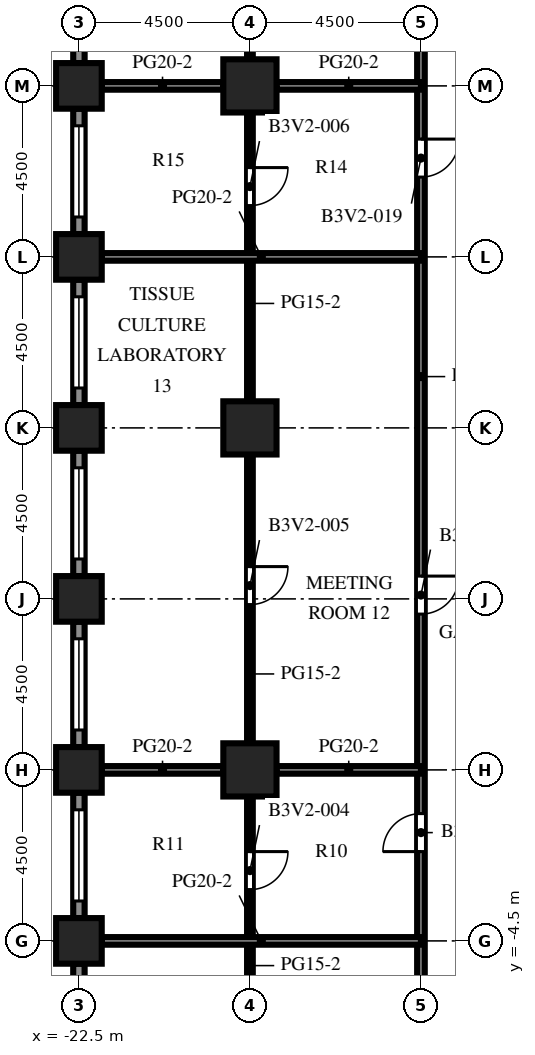
"""IFC4 building model, lengths in metres.
Left out: names, types, materials, properties, quantities, classifications, styles, units other than length and angle.
Written with IfcOpenShell. Run it as: python <this file> out.ifc"""

import sys

from ifc_helpers import new_model, si_unit, direction, frame, frame_2d, origin, origin_2d, place, context, subcontext, project, spatial, rectangle, extrude, element, fill, save


model = new_model("IFC4")
c1 = context("Model", 3, precision=1e-05, world=origin(), true_north=direction((0.0, 1.0)))
c2 = subcontext(c1, "Body", "Model", "MODEL_VIEW")
j1 = project(units=[si_unit("LENGTHUNIT", "METRE"), si_unit("PLANEANGLEUNIT", "RADIAN")], contexts=[c1])
p1 = place(None, origin())
s1 = spatial("IfcSite", under=j1, at=p1, CompositionType="ELEMENT")
p2 = place(p1, origin())
s2 = spatial("IfcBuilding", under=s1, at=p2, CompositionType="ELEMENT")
p3 = place(p2, frame((0.0, 0.0, 106.6)))
s3 = spatial("IfcBuildingStorey", under=s2, at=p3, CompositionType="ELEMENT", Elevation=106.6)
for number, where, z_axis, x_axis in (
    (1, (-22.5, -4.5, 0.0), (0.0, 0.0, 1.0), (1.0, 0.0, 0.0)),
    (2, (-22.5, 0.0, 0.0), (0.0, 0.0, 1.0), (1.0, 0.0, 0.0)),
    (3, (-22.5, 4.5, 0.0), (0.0, 0.0, 1.0), (1.0, 0.0, 0.0)),
    (4, (-22.5, 9.0, 0.0), (0.0, 0.0, 1.0), (1.0, 0.0, 0.0)),
    (5, (-22.5, 13.5, 0.0), (0.0, 0.0, 1.0), (1.0, 0.0, 0.0)),
    (6, (-22.5, 18.0, 0.0), (0.0, 0.0, 1.0), (1.0, 0.0, 0.0)),
):
    element("IfcColumn", number, at=place(p3, frame(where, z_axis=z_axis, x_axis=x_axis)), inside=s3, PredefinedType="COLUMN", context=c2, shape_type="SweptSolid", body=[
        extrude(rectangle(XDim=1.2, YDim=1.2, at=origin_2d()), origin(), (0.0, 0.0, 1.0), 4.1),
    ])
for number, where, z_axis, x_axis in (
    (7, (-18.0, 0.0, 0.0), (0.0, 0.0, 1.0), (1.0, 0.0, 0.0)),
    (8, (-18.0, 9.0, 0.0), (0.0, 0.0, 1.0), (1.0, 0.0, 0.0)),
    (9, (-18.0, 18.0, 0.0), (0.0, 0.0, 1.0), (1.0, 0.0, 0.0)),
):
    element("IfcColumn", number, at=place(p3, frame(where, z_axis=z_axis, x_axis=x_axis)), inside=s3, PredefinedType="COLUMN", context=c2, shape_type="SweptSolid", body=[
        extrude(rectangle(XDim=1.4, YDim=1.4, at=origin_2d()), origin(), (0.0, 0.0, 1.0), 4.1),
    ])
p4 = place(p3, frame((-22.5, 18.6, 0.0), z_axis=(0.0, 0.0, 1.0), x_axis=(0.0, 1.0, 0.0)))
e10 = element("IfcWall", 10, at=p4, inside=s3, PredefinedType="SOLIDWALL", context=c2, shape_type="SweptSolid", body=[
    extrude(rectangle(XDim=3.3, YDim=0.3, at=frame_2d((1.65, 0.0))), origin(), (0.0, 0.0, 1.0), 2.6),
])
p5 = place(p4, frame((1.15, 0.0, 0.0)))
e11 = element("IfcOpeningElement", 11, at=p5, cuts=e10, PredefinedType="OPENING", context=c2, shape_type="SweptSolid", body=[
    extrude(rectangle(XDim=1.0, YDim=2.2, at=frame_2d((0.5, 1.1))), frame((0.0, 0.16, 0.0), z_axis=(0.0, -1.0, 0.0), x_axis=(1.0, 0.0, 0.0)), (0.0, 0.0, 1.0), 0.32),
])
p6 = place(p3, frame((-22.5, 14.1, 0.0), z_axis=(0.0, 0.0, 1.0), x_axis=(0.0, 1.0, 0.0)))
e12 = element("IfcWall", 12, at=p6, inside=s3, PredefinedType="SOLIDWALL", context=c2, shape_type="SweptSolid", body=[
    extrude(rectangle(XDim=3.3, YDim=0.3, at=frame_2d((1.65, 0.0))), origin(), (0.0, 0.0, 1.0), 2.6),
])
p7 = place(p6, frame((0.45, 0.0, 0.8)))
e13 = element("IfcOpeningElement", 13, at=p7, cuts=e12, PredefinedType="OPENING", context=c2, shape_type="SweptSolid", body=[
    extrude(rectangle(XDim=2.4, YDim=1.7, at=frame_2d((1.2, 0.85))), frame((0.0, 0.16, 0.0), z_axis=(0.0, -1.0, 0.0), x_axis=(1.0, 0.0, 0.0)), (0.0, 0.0, 1.0), 0.32),
])
p8 = place(p3, frame((-22.5, 9.6, 0.0), z_axis=(0.0, 0.0, 1.0), x_axis=(0.0, 1.0, 0.0)))
e14 = element("IfcWall", 14, at=p8, inside=s3, PredefinedType="SOLIDWALL", context=c2, shape_type="SweptSolid", body=[
    extrude(rectangle(XDim=3.3, YDim=0.3, at=frame_2d((1.65, 0.0))), origin(), (0.0, 0.0, 1.0), 2.6),
])
p9 = place(p8, frame((0.45, 0.0, 0.8)))
e15 = element("IfcOpeningElement", 15, at=p9, cuts=e14, PredefinedType="OPENING", context=c2, shape_type="SweptSolid", body=[
    extrude(rectangle(XDim=2.4, YDim=1.7, at=frame_2d((1.2, 0.85))), frame((0.0, 0.16, 0.0), z_axis=(0.0, -1.0, 0.0), x_axis=(1.0, 0.0, 0.0)), (0.0, 0.0, 1.0), 0.32),
])
p10 = place(p3, frame((-22.5, 5.1, 0.0), z_axis=(0.0, 0.0, 1.0), x_axis=(0.0, 1.0, 0.0)))
e16 = element("IfcWall", 16, at=p10, inside=s3, PredefinedType="SOLIDWALL", context=c2, shape_type="SweptSolid", body=[
    extrude(rectangle(XDim=3.3, YDim=0.3, at=frame_2d((1.65, 0.0))), origin(), (0.0, 0.0, 1.0), 2.6),
])
p11 = place(p10, frame((0.45, 0.0, 0.8)))
e17 = element("IfcOpeningElement", 17, at=p11, cuts=e16, PredefinedType="OPENING", context=c2, shape_type="SweptSolid", body=[
    extrude(rectangle(XDim=2.4, YDim=1.7, at=frame_2d((1.2, 0.85))), frame((0.0, 0.16, 0.0), z_axis=(0.0, -1.0, 0.0), x_axis=(1.0, 0.0, 0.0)), (0.0, 0.0, 1.0), 0.32),
])
p12 = place(p3, frame((-22.5, 0.6, 0.0), z_axis=(0.0, 0.0, 1.0), x_axis=(0.0, 1.0, 0.0)))
e18 = element("IfcWall", 18, at=p12, inside=s3, PredefinedType="SOLIDWALL", context=c2, shape_type="SweptSolid", body=[
    extrude(rectangle(XDim=3.3, YDim=0.3, at=frame_2d((1.65, 0.0))), origin(), (0.0, 0.0, 1.0), 2.6),
])
p13 = place(p12, frame((0.45, 0.0, 0.8)))
e19 = element("IfcOpeningElement", 19, at=p13, cuts=e18, PredefinedType="OPENING", context=c2, shape_type="SweptSolid", body=[
    extrude(rectangle(XDim=2.4, YDim=1.7, at=frame_2d((1.2, 0.85))), frame((0.0, 0.16, 0.0), z_axis=(0.0, -1.0, 0.0), x_axis=(1.0, 0.0, 0.0)), (0.0, 0.0, 1.0), 0.32),
])
p14 = place(p3, frame((-22.5, -3.9, 0.0), z_axis=(0.0, 0.0, 1.0), x_axis=(0.0, 1.0, 0.0)))
e20 = element("IfcWall", 20, at=p14, inside=s3, PredefinedType="SOLIDWALL", context=c2, shape_type="SweptSolid", body=[
    extrude(rectangle(XDim=3.3, YDim=0.3, at=frame_2d((1.65, 0.0))), origin(), (0.0, 0.0, 1.0), 2.6),
])
p15 = place(p14, frame((0.45, 0.0, 0.8)))
e21 = element("IfcOpeningElement", 21, at=p15, cuts=e20, PredefinedType="OPENING", context=c2, shape_type="SweptSolid", body=[
    extrude(rectangle(XDim=2.4, YDim=1.7, at=frame_2d((1.2, 0.85))), frame((0.0, 0.16, 0.0), z_axis=(0.0, -1.0, 0.0), x_axis=(1.0, 0.0, 0.0)), (0.0, 0.0, 1.0), 0.32),
])
p16 = place(p3, frame((-22.5, -8.4, 0.0), z_axis=(0.0, 0.0, 1.0), x_axis=(0.0, 1.0, 0.0)))
e22 = element("IfcWall", 22, at=p16, inside=s3, PredefinedType="SOLIDWALL", context=c2, shape_type="SweptSolid", body=[
    extrude(rectangle(XDim=3.3, YDim=0.3, at=frame_2d((1.65, 0.0))), origin(), (0.0, 0.0, 1.0), 2.6),
])
p17 = place(p16, frame((0.45, 0.0, 0.8)))
e23 = element("IfcOpeningElement", 23, at=p17, cuts=e22, PredefinedType="OPENING", context=c2, shape_type="SweptSolid", body=[
    extrude(rectangle(XDim=2.4, YDim=1.7, at=frame_2d((1.2, 0.85))), frame((0.0, 0.16, 0.0), z_axis=(0.0, -1.0, 0.0), x_axis=(1.0, 0.0, 0.0)), (0.0, 0.0, 1.0), 0.32),
])
p18 = place(p3, frame((-18.0, -8.3, 0.0), z_axis=(0.0, 0.0, 1.0), x_axis=(0.0, 1.0, 0.0)))
e24 = element("IfcWall", 24, at=p18, inside=s3, PredefinedType="PARTITIONING", context=c2, shape_type="SweptSolid", body=[
    extrude(rectangle(XDim=7.6, YDim=0.15, at=frame_2d((3.8, 0.0))), origin(), (0.0, 0.0, 1.0), 3.5),
])
p19 = place(p18, frame((0.15, 0.0, 0.0)))
e25 = element("IfcOpeningElement", 25, at=p19, cuts=e24, PredefinedType="OPENING", context=c2, shape_type="SweptSolid", body=[
    extrude(rectangle(XDim=1.0, YDim=2.1, at=frame_2d((0.5, 1.05))), frame((0.0, 0.085, 0.0), z_axis=(0.0, -1.0, 0.0), x_axis=(1.0, 0.0, 0.0)), (0.0, 0.0, 1.0), 0.17),
])
p20 = place(p18, frame((5.15, 0.0, 0.0)))
e26 = element("IfcOpeningElement", 26, at=p20, cuts=e24, PredefinedType="OPENING", context=c2, shape_type="SweptSolid", body=[
    extrude(rectangle(XDim=1.0, YDim=2.1, at=frame_2d((0.5, 1.05))), frame((0.0, 0.085, 0.0), z_axis=(0.0, -1.0, 0.0), x_axis=(1.0, 0.0, 0.0)), (0.0, 0.0, 1.0), 0.17),
])
p21 = place(p3, frame((-18.0, 0.7, 0.0), z_axis=(0.0, 0.0, 1.0), x_axis=(0.0, 1.0, 0.0)))
e27 = element("IfcWall", 27, at=p21, inside=s3, PredefinedType="PARTITIONING", context=c2, shape_type="SweptSolid", body=[
    extrude(rectangle(XDim=7.6, YDim=0.15, at=frame_2d((3.8, 0.0))), origin(), (0.0, 0.0, 1.0), 3.5),
])
p22 = place(p21, frame((3.65, 0.0, 0.0)))
e28 = element("IfcOpeningElement", 28, at=p22, cuts=e27, PredefinedType="OPENING", context=c2, shape_type="SweptSolid", body=[
    extrude(rectangle(XDim=1.0, YDim=2.1, at=frame_2d((0.5, 1.05))), frame((0.0, 0.085, 0.0), z_axis=(0.0, -1.0, 0.0), x_axis=(1.0, 0.0, 0.0)), (0.0, 0.0, 1.0), 0.17),
])
p23 = place(p3, frame((-18.0, 9.7, 0.0), z_axis=(0.0, 0.0, 1.0), x_axis=(0.0, 1.0, 0.0)))
e29 = element("IfcWall", 29, at=p23, inside=s3, PredefinedType="PARTITIONING", context=c2, shape_type="SweptSolid", body=[
    extrude(rectangle(XDim=7.6, YDim=0.15, at=frame_2d((3.8, 0.0))), origin(), (0.0, 0.0, 1.0), 3.5),
])
p24 = place(p23, frame((5.15, 0.0, 0.0)))
e30 = element("IfcOpeningElement", 30, at=p24, cuts=e29, PredefinedType="OPENING", context=c2, shape_type="SweptSolid", body=[
    extrude(rectangle(XDim=1.0, YDim=2.1, at=frame_2d((0.5, 1.05))), frame((0.0, 0.085, 0.0), z_axis=(0.0, -1.0, 0.0), x_axis=(1.0, 0.0, 0.0)), (0.0, 0.0, 1.0), 0.17),
])
p25 = place(p3, frame((-18.0, 18.7, 0.0), z_axis=(0.0, 0.0, 1.0), x_axis=(0.0, 1.0, 0.0)))
e31 = element("IfcWall", 31, at=p25, inside=s3, PredefinedType="PARTITIONING", context=c2, shape_type="SweptSolid", body=[
    extrude(rectangle(XDim=3.1, YDim=0.15, at=frame_2d((1.55, 0.0))), origin(), (0.0, 0.0, 1.0), 3.5),
])
p26 = place(p3, frame((-13.5, -21.9, 0.0), z_axis=(0.0, 0.0, 1.0), x_axis=(0.0, 1.0, 0.0)))
e32 = element("IfcWall", 32, at=p26, inside=s3, PredefinedType="PARTITIONING", context=c2, shape_type="SweptSolid", body=[
    extrude(rectangle(XDim=52.8, YDim=0.2, at=frame_2d((26.4, 0.0))), origin(), (0.0, 0.0, 1.0), 3.5),
])
p27 = place(p26, frame((0.75, 0.0, 0.0)))
e33 = element("IfcOpeningElement", 33, at=p27, cuts=e32, PredefinedType="OPENING", context=c2, shape_type="SweptSolid", body=[
    extrude(rectangle(XDim=1.0, YDim=2.1, at=frame_2d((0.5, 1.05))), frame((0.0, 0.11, 0.0), z_axis=(0.0, -1.0, 0.0), x_axis=(1.0, 0.0, 0.0)), (0.0, 0.0, 1.0), 0.22),
])
p28 = place(p26, frame((5.0, 0.0, 0.0)))
e34 = element("IfcOpeningElement", 34, at=p28, cuts=e32, PredefinedType="OPENING", context=c2, shape_type="SweptSolid", body=[
    extrude(rectangle(XDim=1.0, YDim=2.1, at=frame_2d((0.5, 1.05))), frame((0.0, 0.11, 0.0), z_axis=(0.0, -1.0, 0.0), x_axis=(1.0, 0.0, 0.0)), (0.0, 0.0, 1.0), 0.22),
])
p29 = place(p26, frame((12.5, 0.0, 0.0)))
e35 = element("IfcOpeningElement", 35, at=p29, cuts=e32, PredefinedType="OPENING", context=c2, shape_type="SweptSolid", body=[
    extrude(rectangle(XDim=1.0, YDim=2.1, at=frame_2d((0.5, 1.05))), frame((0.0, 0.11, 0.0), z_axis=(0.0, -1.0, 0.0), x_axis=(1.0, 0.0, 0.0)), (0.0, 0.0, 1.0), 0.22),
])
p30 = place(p26, frame((19.75, 0.0, 0.0)))
e36 = element("IfcOpeningElement", 36, at=p30, cuts=e32, PredefinedType="OPENING", context=c2, shape_type="SweptSolid", body=[
    extrude(rectangle(XDim=1.0, YDim=2.1, at=frame_2d((0.5, 1.05))), frame((0.0, 0.11, 0.0), z_axis=(0.0, -1.0, 0.0), x_axis=(1.0, 0.0, 0.0)), (0.0, 0.0, 1.0), 0.22),
])
p31 = place(p26, frame((26.0, 0.0, 0.0)))
e37 = element("IfcOpeningElement", 37, at=p31, cuts=e32, PredefinedType="OPENING", context=c2, shape_type="SweptSolid", body=[
    extrude(rectangle(XDim=1.0, YDim=2.1, at=frame_2d((0.5, 1.05))), frame((0.0, 0.11, 0.0), z_axis=(0.0, -1.0, 0.0), x_axis=(1.0, 0.0, 0.0)), (0.0, 0.0, 1.0), 0.22),
])
p32 = place(p26, frame((37.5, 0.0, 0.0)))
e38 = element("IfcOpeningElement", 38, at=p32, cuts=e32, PredefinedType="OPENING", context=c2, shape_type="SweptSolid", body=[
    extrude(rectangle(XDim=1.0, YDim=2.1, at=frame_2d((0.5, 1.05))), frame((0.0, 0.11, 0.0), z_axis=(0.0, -1.0, 0.0), x_axis=(1.0, 0.0, 0.0)), (0.0, 0.0, 1.0), 0.22),
])
p33 = place(p26, frame((43.25, 0.0, 0.0)))
e39 = element("IfcOpeningElement", 39, at=p33, cuts=e32, PredefinedType="OPENING", context=c2, shape_type="SweptSolid", body=[
    extrude(rectangle(XDim=1.0, YDim=2.1, at=frame_2d((0.5, 1.05))), frame((0.0, 0.11, 0.0), z_axis=(0.0, -1.0, 0.0), x_axis=(1.0, 0.0, 0.0)), (0.0, 0.0, 1.0), 0.22),
])
p34 = place(p26, frame((50.0, 0.0, 0.0)))
e40 = element("IfcOpeningElement", 40, at=p34, cuts=e32, PredefinedType="OPENING", context=c2, shape_type="SweptSolid", body=[
    extrude(rectangle(XDim=1.0, YDim=2.1, at=frame_2d((0.5, 1.05))), frame((0.0, 0.11, 0.0), z_axis=(0.0, -1.0, 0.0), x_axis=(1.0, 0.0, 0.0)), (0.0, 0.0, 1.0), 0.22),
])
p35 = place(p3, frame((-21.9, -4.5, 0.0), z_axis=(0.0, 0.0, 1.0), x_axis=(1.0, 0.0, 0.0)))
e41 = element("IfcWall", 41, at=p35, inside=s3, PredefinedType="PARTITIONING", context=c2, shape_type="SweptSolid", body=[
    extrude(rectangle(XDim=8.4, YDim=0.2, at=frame_2d((4.2, 0.0))), origin(), (0.0, 0.0, 1.0), 3.5),
])
p36 = place(p3, frame((-21.9, 0.0, 0.0), z_axis=(0.0, 0.0, 1.0), x_axis=(1.0, 0.0, 0.0)))
e42 = element("IfcWall", 42, at=p36, inside=s3, PredefinedType="PARTITIONING", context=c2, shape_type="SweptSolid", body=[
    extrude(rectangle(XDim=3.2, YDim=0.2, at=frame_2d((1.6, 0.0))), origin(), (0.0, 0.0, 1.0), 3.5),
])
p37 = place(p3, frame((-17.3, 0.0, 0.0), z_axis=(0.0, 0.0, 1.0), x_axis=(1.0, 0.0, 0.0)))
e43 = element("IfcWall", 43, at=p37, inside=s3, PredefinedType="PARTITIONING", context=c2, shape_type="SweptSolid", body=[
    extrude(rectangle(XDim=3.8, YDim=0.2, at=frame_2d((1.9, 0.0))), origin(), (0.0, 0.0, 1.0), 3.5),
])
p38 = place(p3, frame((-21.9, 13.5, 0.0), z_axis=(0.0, 0.0, 1.0), x_axis=(1.0, 0.0, 0.0)))
e44 = element("IfcWall", 44, at=p38, inside=s3, PredefinedType="PARTITIONING", context=c2, shape_type="SweptSolid", body=[
    extrude(rectangle(XDim=8.4, YDim=0.2, at=frame_2d((4.2, 0.0))), origin(), (0.0, 0.0, 1.0), 3.5),
])
p39 = place(p3, frame((-21.9, 18.0, 0.0), z_axis=(0.0, 0.0, 1.0), x_axis=(1.0, 0.0, 0.0)))
e45 = element("IfcWall", 45, at=p39, inside=s3, PredefinedType="PARTITIONING", context=c2, shape_type="SweptSolid", body=[
    extrude(rectangle(XDim=3.2, YDim=0.2, at=frame_2d((1.6, 0.0))), origin(), (0.0, 0.0, 1.0), 3.5),
])
p40 = place(p3, frame((-17.3, 18.0, 0.0), z_axis=(0.0, 0.0, 1.0), x_axis=(1.0, 0.0, 0.0)))
e46 = element("IfcWall", 46, at=p40, inside=s3, PredefinedType="PARTITIONING", context=c2, shape_type="SweptSolid", body=[
    extrude(rectangle(XDim=3.8, YDim=0.2, at=frame_2d((1.9, 0.0))), origin(), (0.0, 0.0, 1.0), 3.5),
])
p41 = place(p7, origin())
e47 = element("IfcWindow", 47, at=p41, inside=s3, PartitioningType="SINGLE_PANEL", PredefinedType="WINDOW", context=c2, shape_type="SweptSolid", body=[
    extrude(rectangle(XDim=2.4, YDim=1.7, at=frame_2d((1.2, 0.85))), frame((0.0, 0.03, 0.0), z_axis=(0.0, -1.0, 0.0), x_axis=(1.0, 0.0, 0.0)), (0.0, 0.0, 1.0), 0.06),
])
fill(e13, e47)
p42 = place(p9, origin())
e48 = element("IfcWindow", 48, at=p42, inside=s3, PartitioningType="SINGLE_PANEL", PredefinedType="WINDOW", context=c2, shape_type="SweptSolid", body=[
    extrude(rectangle(XDim=2.4, YDim=1.7, at=frame_2d((1.2, 0.85))), frame((0.0, 0.03, 0.0), z_axis=(0.0, -1.0, 0.0), x_axis=(1.0, 0.0, 0.0)), (0.0, 0.0, 1.0), 0.06),
])
fill(e15, e48)
p43 = place(p11, origin())
e49 = element("IfcWindow", 49, at=p43, inside=s3, PartitioningType="SINGLE_PANEL", PredefinedType="WINDOW", context=c2, shape_type="SweptSolid", body=[
    extrude(rectangle(XDim=2.4, YDim=1.7, at=frame_2d((1.2, 0.85))), frame((0.0, 0.03, 0.0), z_axis=(0.0, -1.0, 0.0), x_axis=(1.0, 0.0, 0.0)), (0.0, 0.0, 1.0), 0.06),
])
fill(e17, e49)
p44 = place(p13, origin())
e50 = element("IfcWindow", 50, at=p44, inside=s3, PartitioningType="SINGLE_PANEL", PredefinedType="WINDOW", context=c2, shape_type="SweptSolid", body=[
    extrude(rectangle(XDim=2.4, YDim=1.7, at=frame_2d((1.2, 0.85))), frame((0.0, 0.03, 0.0), z_axis=(0.0, -1.0, 0.0), x_axis=(1.0, 0.0, 0.0)), (0.0, 0.0, 1.0), 0.06),
])
fill(e19, e50)
p45 = place(p15, origin())
e51 = element("IfcWindow", 51, at=p45, inside=s3, PartitioningType="SINGLE_PANEL", PredefinedType="WINDOW", context=c2, shape_type="SweptSolid", body=[
    extrude(rectangle(XDim=2.4, YDim=1.7, at=frame_2d((1.2, 0.85))), frame((0.0, 0.03, 0.0), z_axis=(0.0, -1.0, 0.0), x_axis=(1.0, 0.0, 0.0)), (0.0, 0.0, 1.0), 0.06),
])
fill(e21, e51)
p46 = place(p20, origin())
e52 = element("IfcDoor", 52, at=p46, inside=s3, OperationType="SINGLE_SWING_RIGHT", PredefinedType="DOOR", context=c2, shape_type="SweptSolid", body=[
    extrude(rectangle(XDim=1.0, YDim=2.1, at=frame_2d((0.5, 1.05))), frame((0.0, 0.025, 0.0), z_axis=(0.0, -1.0, 0.0), x_axis=(1.0, 0.0, 0.0)), (0.0, 0.0, 1.0), 0.05),
])
fill(e26, e52)
p47 = place(p22, origin())
e53 = element("IfcDoor", 53, at=p47, inside=s3, OperationType="SINGLE_SWING_RIGHT", PredefinedType="DOOR", context=c2, shape_type="SweptSolid", body=[
    extrude(rectangle(XDim=1.0, YDim=2.1, at=frame_2d((0.5, 1.05))), frame((0.0, 0.025, 0.0), z_axis=(0.0, -1.0, 0.0), x_axis=(1.0, 0.0, 0.0)), (0.0, 0.0, 1.0), 0.05),
])
fill(e28, e53)
p48 = place(p24, origin())
e54 = element("IfcDoor", 54, at=p48, inside=s3, OperationType="SINGLE_SWING_RIGHT", PredefinedType="DOOR", context=c2, shape_type="SweptSolid", body=[
    extrude(rectangle(XDim=1.0, YDim=2.1, at=frame_2d((0.5, 1.05))), frame((0.0, 0.025, 0.0), z_axis=(0.0, -1.0, 0.0), x_axis=(1.0, 0.0, 0.0)), (0.0, 0.0, 1.0), 0.05),
])
fill(e30, e54)
p49 = place(p30, origin())
e55 = element("IfcDoor", 55, at=p49, inside=s3, OperationType="SINGLE_SWING_LEFT", PredefinedType="DOOR", context=c2, shape_type="SweptSolid", body=[
    extrude(rectangle(XDim=1.0, YDim=2.1, at=frame_2d((0.5, 1.05))), frame((0.0, 0.025, 0.0), z_axis=(0.0, -1.0, 0.0), x_axis=(1.0, 0.0, 0.0)), (0.0, 0.0, 1.0), 0.05),
])
fill(e36, e55)
p50 = place(p31, origin())
e56 = element("IfcDoor", 56, at=p50, inside=s3, OperationType="SINGLE_SWING_RIGHT", PredefinedType="DOOR", context=c2, shape_type="SweptSolid", body=[
    extrude(rectangle(XDim=1.0, YDim=2.1, at=frame_2d((0.5, 1.05))), frame((0.0, 0.025, 0.0), z_axis=(0.0, -1.0, 0.0), x_axis=(1.0, 0.0, 0.0)), (0.0, 0.0, 1.0), 0.05),
])
fill(e37, e56)
p51 = place(p32, origin())
e57 = element("IfcDoor", 57, at=p51, inside=s3, OperationType="SINGLE_SWING_RIGHT", PredefinedType="DOOR", context=c2, shape_type="SweptSolid", body=[
    extrude(rectangle(XDim=1.0, YDim=2.1, at=frame_2d((0.5, 1.05))), frame((0.0, 0.025, 0.0), z_axis=(0.0, -1.0, 0.0), x_axis=(1.0, 0.0, 0.0)), (0.0, 0.0, 1.0), 0.05),
])
fill(e38, e57)
save(model, sys.argv[1])
